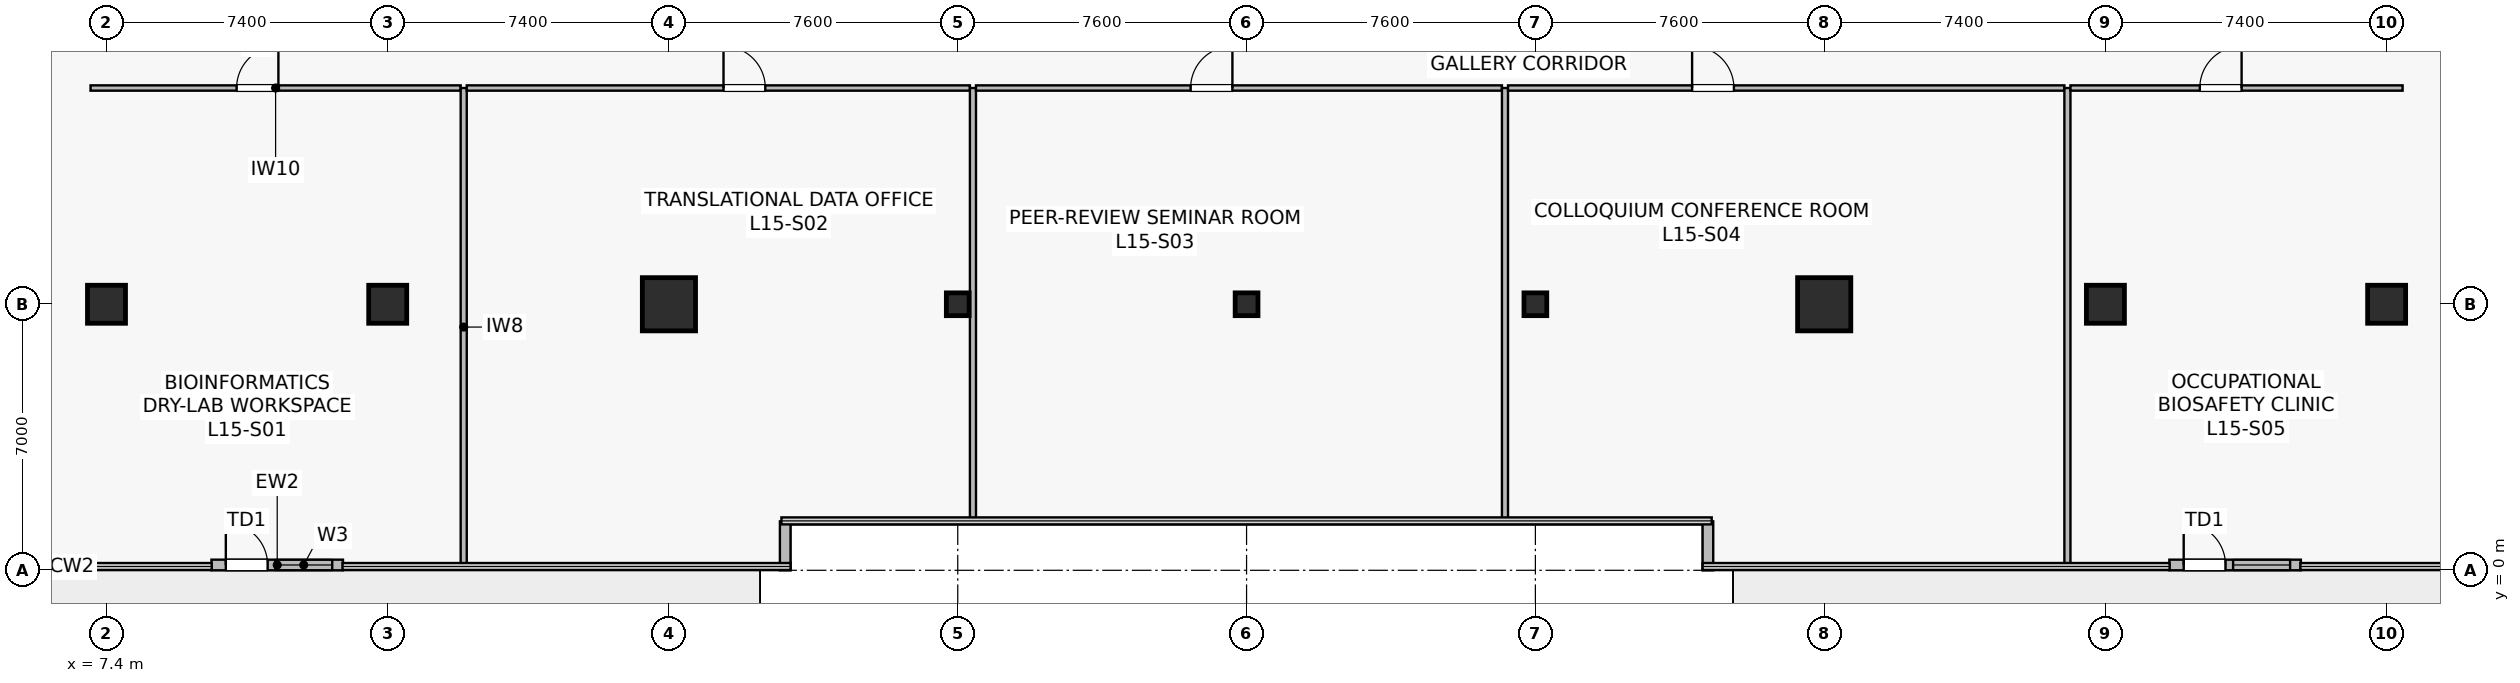
"""IFC4 building model, lengths in metres.
Left out: names, types, materials, properties, quantities, classifications, styles, units other than length and angle.
Written with IfcOpenShell. Run it as: python <this file> out.ifc"""

import sys

from ifc_helpers import new_model, si_unit, direction, frame, frame_2d, origin, origin_2d, place, context, subcontext, project, spatial, rectangle, hollow_rectangle, extrude, source, transform, mapped, element, fill, save


model = new_model("IFC4")
c1 = context("Model", 3, precision=1e-05, world=origin(), true_north=direction((0.0, 1.0)))
c2 = subcontext(c1, "Body", "Model", "MODEL_VIEW")
j1 = project(units=[si_unit("LENGTHUNIT", "METRE"), si_unit("PLANEANGLEUNIT", "RADIAN")], contexts=[c1])
p1 = place(None, origin())
s1 = spatial("IfcSite", under=j1, at=p1, CompositionType="ELEMENT")
p2 = place(p1, origin())
s2 = spatial("IfcBuilding", under=s1, at=p2, CompositionType="ELEMENT")
p3 = place(p2, frame((0.0, 0.0, 62.1)))
s3 = spatial("IfcBuildingStorey", under=s2, at=p3, CompositionType="ELEMENT", Elevation=62.1)
m1 = source(origin(), c2, "Body", "SweptSolid", [
    extrude(rectangle(XDim=1.0, YDim=1.0, at=origin_2d()), origin(), (0.0, 0.0, 1.0), 4.1),
])
p4 = place(p3, frame((14.8, 7.0, 0.0), z_axis=(0.0, 0.0, 1.0), x_axis=(1.0, 0.0, 0.0)))
e1 = element("IfcColumn", 1, at=p4, inside=s3, PredefinedType="COLUMN", context=c2, shape_type="MappedRepresentation", body=[
    mapped(m1, transform((0.0, 0.0, 0.0), scale=1.0)),
])
m2 = source(origin(), c2, "Body", "SweptSolid", [
    extrude(rectangle(XDim=1.4, YDim=1.4, at=origin_2d()), origin(), (0.0, 0.0, 1.0), 4.1),
])
for number, where, z_axis, x_axis in (
    (2, (22.2, 7.0, 0.0), (0.0, 0.0, 1.0), (1.0, 0.0, 0.0)),
    (3, (52.6, 7.0, 0.0), (0.0, 0.0, 1.0), (1.0, 0.0, 0.0)),
):
    element("IfcColumn", number, at=place(p3, frame(where, z_axis=z_axis, x_axis=x_axis)), inside=s3, PredefinedType="COLUMN", context=c2, shape_type="MappedRepresentation", body=[
        mapped(m2, transform((0.0, 0.0, 0.0), scale=1.0)),
    ])
for number, where, z_axis, x_axis in (
    (4, (60.0, 7.0, 0.0), (0.0, 0.0, 1.0), (1.0, 0.0, 0.0)),
    (5, (7.4, 7.0, 0.0), (0.0, 0.0, 1.0), (1.0, 0.0, 0.0)),
    (6, (67.4, 7.0, 0.0), (0.0, 0.0, 1.0), (1.0, 0.0, 0.0)),
):
    element("IfcColumn", number, at=place(p3, frame(where, z_axis=z_axis, x_axis=x_axis)), inside=s3, PredefinedType="COLUMN", context=c2, shape_type="MappedRepresentation", body=[
        mapped(m1, transform((0.0, 0.0, 0.0), scale=1.0)),
    ])
m3 = source(origin(), c2, "Body", "SweptSolid", [
    extrude(hollow_rectangle(XDim=0.6, YDim=0.6, WallThickness=0.028, at=origin_2d()), origin(), (0.0, 0.0, 1.0), 4.1),
])
for number, where, z_axis, x_axis in (
    (7, (29.8, 7.0, 0.0), (0.0, 0.0, 1.0), (1.0, 0.0, 0.0)),
    (8, (37.4, 7.0, 0.0), (0.0, 0.0, 1.0), (1.0, 0.0, 0.0)),
    (9, (45.0, 7.0, 0.0), (0.0, 0.0, 1.0), (1.0, 0.0, 0.0)),
):
    element("IfcColumn", number, at=place(p3, frame(where, z_axis=z_axis, x_axis=x_axis)), inside=s3, PredefinedType="COLUMN", context=c2, shape_type="MappedRepresentation", body=[
        mapped(m3, transform((0.0, 0.0, 0.0), scale=1.0)),
    ])
p5 = place(p3, frame((10.162, 0.14, 0.0), z_axis=(0.0, 0.0, 1.0), x_axis=(1.0, 0.0, 0.0)))
e10 = element("IfcWall", 10, at=p5, inside=s3, PredefinedType="STANDARD", context=c2, shape_type="SweptSolid", body=[
    extrude(rectangle(XDim=3.461, YDim=0.28, at=frame_2d((1.73, 0.0))), origin(), (0.0, 0.0, 1.0), 3.78),
])
p6 = place(p5, frame((0.378, 0.0, 0.0)))
e11 = element("IfcOpeningElement", 11, at=p6, cuts=e10, PredefinedType="OPENING", context=c2, shape_type="SweptSolid", body=[
    extrude(rectangle(XDim=1.1, YDim=2.2, at=frame_2d((0.55, 1.1))), frame((0.0, 0.15, 0.0), z_axis=(0.0, -1.0, 0.0), x_axis=(1.0, 0.0, 0.0)), (0.0, 0.0, 1.0), 0.3),
])
p7 = place(p5, frame((1.678, 0.0, 0.9)))
e12 = element("IfcOpeningElement", 12, at=p7, cuts=e10, PredefinedType="OPENING", context=c2, shape_type="SweptSolid", body=[
    extrude(rectangle(XDim=1.5, YDim=2.2, at=frame_2d((0.75, 1.1))), frame((0.0, 0.15, 0.0), z_axis=(0.0, -1.0, 0.0), x_axis=(1.0, 0.0, 0.0)), (0.0, 0.0, 1.0), 0.3),
])
p8 = place(p3, frame((61.682, 0.14, 0.0), z_axis=(0.0, 0.0, 1.0), x_axis=(1.0, 0.0, 0.0)))
e13 = element("IfcWall", 13, at=p8, inside=s3, PredefinedType="STANDARD", context=c2, shape_type="SweptSolid", body=[
    extrude(rectangle(XDim=3.461, YDim=0.28, at=frame_2d((1.73, 0.0))), origin(), (0.0, 0.0, 1.0), 3.78),
])
p9 = place(p8, frame((0.378, 0.0, 0.0)))
e14 = element("IfcOpeningElement", 14, at=p9, cuts=e13, PredefinedType="OPENING", context=c2, shape_type="SweptSolid", body=[
    extrude(rectangle(XDim=1.1, YDim=2.2, at=frame_2d((0.55, 1.1))), frame((0.0, 0.15, 0.0), z_axis=(0.0, -1.0, 0.0), x_axis=(1.0, 0.0, 0.0)), (0.0, 0.0, 1.0), 0.3),
])
p10 = place(p8, frame((1.678, 0.0, 0.9)))
e15 = element("IfcOpeningElement", 15, at=p10, cuts=e13, PredefinedType="OPENING", context=c2, shape_type="SweptSolid", body=[
    extrude(rectangle(XDim=1.5, YDim=2.2, at=frame_2d((0.75, 1.1))), frame((0.0, 0.15, 0.0), z_axis=(0.0, -1.0, 0.0), x_axis=(1.0, 0.0, 0.0)), (0.0, 0.0, 1.0), 0.3),
])
for number, where, z_axis, x_axis in (
    (16, (25.26, 0.0, 0.0), (0.0, 0.0, 1.0), (0.0, 1.0, 0.0)),
    (17, (49.54, 1.288, 0.0), (0.0, 0.0, 1.0), (0.0, -1.0, 0.0)),
):
    element("IfcWall", number, at=place(p3, frame(where, z_axis=z_axis, x_axis=x_axis)), inside=s3, PredefinedType="STANDARD", context=c2, shape_type="SweptSolid", body=[
        extrude(rectangle(XDim=1.288, YDim=0.28, at=frame_2d((0.644, 0.0))), origin(), (0.0, 0.0, 1.0), 3.78),
    ])
p11 = place(p3, frame((6.98, 12.69, 0.0), z_axis=(0.0, 0.0, 1.0), x_axis=(1.0, 0.0, 0.0)))
e18 = element("IfcWall", 18, at=p11, inside=s3, PredefinedType="PARTITIONING", context=c2, shape_type="SweptSolid", body=[
    extrude(rectangle(XDim=9.74, YDim=0.14, at=frame_2d((4.87, 0.0))), origin(), (0.0, 0.0, 1.0), 3.115),
])
p12 = place(p11, frame((3.844, 0.0, 0.0)))
e19 = element("IfcOpeningElement", 19, at=p12, cuts=e18, PredefinedType="OPENING", context=c2, shape_type="SweptSolid", body=[
    extrude(rectangle(XDim=1.1, YDim=2.18, at=frame_2d((0.55, 1.09))), frame((0.0, 0.08, 0.0), z_axis=(0.0, -1.0, 0.0), x_axis=(1.0, 0.0, 0.0)), (0.0, 0.0, 1.0), 0.16),
])
p13 = place(p3, frame((16.8, 0.11, 0.0), z_axis=(0.0, 0.0, 1.0), x_axis=(0.0, 1.0, 0.0)))
e20 = element("IfcWall", 20, at=p13, inside=s3, PredefinedType="PARTITIONING", context=c2, shape_type="SweptSolid", body=[
    extrude(rectangle(XDim=12.58, YDim=0.16, at=frame_2d((6.29, 0.0))), origin(), (0.0, 0.0, 1.0), 3.015),
])
p14 = place(p3, frame((16.88, 12.69, 0.0), z_axis=(0.0, 0.0, 1.0), x_axis=(1.0, 0.0, 0.0)))
e21 = element("IfcWall", 21, at=p14, inside=s3, PredefinedType="PARTITIONING", context=c2, shape_type="SweptSolid", body=[
    extrude(rectangle(XDim=13.24, YDim=0.14, at=frame_2d((6.62, 0.0))), origin(), (0.0, 0.0, 1.0), 3.115),
])
p15 = place(p14, frame((6.756, 0.0, 0.0)))
e22 = element("IfcOpeningElement", 22, at=p15, cuts=e21, PredefinedType="OPENING", context=c2, shape_type="SweptSolid", body=[
    extrude(rectangle(XDim=1.1, YDim=2.18, at=frame_2d((0.55, 1.09))), frame((0.0, 0.08, 0.0), z_axis=(0.0, -1.0, 0.0), x_axis=(1.0, 0.0, 0.0)), (0.0, 0.0, 1.0), 0.16),
])
p16 = place(p3, frame((30.2, 1.31, 0.0), z_axis=(0.0, 0.0, 1.0), x_axis=(0.0, 1.0, 0.0)))
e23 = element("IfcWall", 23, at=p16, inside=s3, PredefinedType="PARTITIONING", context=c2, shape_type="SweptSolid", body=[
    extrude(rectangle(XDim=11.38, YDim=0.16, at=frame_2d((5.69, 0.0))), origin(), (0.0, 0.0, 1.0), 3.015),
])
p17 = place(p3, frame((30.28, 12.69, 0.0), z_axis=(0.0, 0.0, 1.0), x_axis=(1.0, 0.0, 0.0)))
e24 = element("IfcWall", 24, at=p17, inside=s3, PredefinedType="PARTITIONING", context=c2, shape_type="SweptSolid", body=[
    extrude(rectangle(XDim=13.84, YDim=0.14, at=frame_2d((6.92, 0.0))), origin(), (0.0, 0.0, 1.0), 3.115),
])
p18 = place(p17, frame((5.648, 0.0, 0.0)))
e25 = element("IfcOpeningElement", 25, at=p18, cuts=e24, PredefinedType="OPENING", context=c2, shape_type="SweptSolid", body=[
    extrude(rectangle(XDim=1.1, YDim=2.18, at=frame_2d((0.55, 1.09))), frame((0.0, 0.08, 0.0), z_axis=(0.0, -1.0, 0.0), x_axis=(1.0, 0.0, 0.0)), (0.0, 0.0, 1.0), 0.16),
])
p19 = place(p3, frame((44.2, 1.31, 0.0), z_axis=(0.0, 0.0, 1.0), x_axis=(0.0, 1.0, 0.0)))
e26 = element("IfcWall", 26, at=p19, inside=s3, PredefinedType="PARTITIONING", context=c2, shape_type="SweptSolid", body=[
    extrude(rectangle(XDim=11.38, YDim=0.16, at=frame_2d((5.69, 0.0))), origin(), (0.0, 0.0, 1.0), 3.015),
])
p20 = place(p3, frame((44.28, 12.69, 0.0), z_axis=(0.0, 0.0, 1.0), x_axis=(1.0, 0.0, 0.0)))
e27 = element("IfcWall", 27, at=p20, inside=s3, PredefinedType="PARTITIONING", context=c2, shape_type="SweptSolid", body=[
    extrude(rectangle(XDim=14.64, YDim=0.14, at=frame_2d((7.32, 0.0))), origin(), (0.0, 0.0, 1.0), 3.115),
])
p21 = place(p20, frame((4.844, 0.0, 0.0)))
e28 = element("IfcOpeningElement", 28, at=p21, cuts=e27, PredefinedType="OPENING", context=c2, shape_type="SweptSolid", body=[
    extrude(rectangle(XDim=1.1, YDim=2.18, at=frame_2d((0.55, 1.09))), frame((0.0, 0.08, 0.0), z_axis=(0.0, -1.0, 0.0), x_axis=(1.0, 0.0, 0.0)), (0.0, 0.0, 1.0), 0.16),
])
p22 = place(p3, frame((59.0, 0.11, 0.0), z_axis=(0.0, 0.0, 1.0), x_axis=(0.0, 1.0, 0.0)))
e29 = element("IfcWall", 29, at=p22, inside=s3, PredefinedType="PARTITIONING", context=c2, shape_type="SweptSolid", body=[
    extrude(rectangle(XDim=12.58, YDim=0.16, at=frame_2d((6.29, 0.0))), origin(), (0.0, 0.0, 1.0), 3.015),
])
p23 = place(p3, frame((59.08, 12.69, 0.0), z_axis=(0.0, 0.0, 1.0), x_axis=(1.0, 0.0, 0.0)))
e30 = element("IfcWall", 30, at=p23, inside=s3, PredefinedType="PARTITIONING", context=c2, shape_type="SweptSolid", body=[
    extrude(rectangle(XDim=8.74, YDim=0.14, at=frame_2d((4.37, 0.0))), origin(), (0.0, 0.0, 1.0), 3.115),
])
p24 = place(p23, frame((3.404, 0.0, 0.0)))
e31 = element("IfcOpeningElement", 31, at=p24, cuts=e30, PredefinedType="OPENING", context=c2, shape_type="SweptSolid", body=[
    extrude(rectangle(XDim=1.1, YDim=2.18, at=frame_2d((0.55, 1.09))), frame((0.0, 0.08, 0.0), z_axis=(0.0, -1.0, 0.0), x_axis=(1.0, 0.0, 0.0)), (0.0, 0.0, 1.0), 0.16),
])
m4 = source(origin(), c2, "Body", "SweptSolid", [
    extrude(rectangle(XDim=1.1, YDim=2.2, at=frame_2d((0.55, 1.1))), frame((0.0, 0.025, 0.0), z_axis=(0.0, -1.0, 0.0), x_axis=(1.0, 0.0, 0.0)), (0.0, 0.0, 1.0), 0.05),
])
p25 = place(p6, origin())
e32 = element("IfcDoor", 32, at=p25, inside=s3, OperationType="SINGLE_SWING_LEFT", PredefinedType="DOOR", context=c2, shape_type="MappedRepresentation", body=[
    mapped(m4, transform((0.0, 0.0, 0.0), scale=1.0)),
])
fill(e11, e32)
m5 = source(origin(), c2, "Body", "SweptSolid", [
    extrude(rectangle(XDim=1.5, YDim=2.2, at=frame_2d((0.75, 1.1))), frame((0.0, 0.03, 0.0), z_axis=(0.0, -1.0, 0.0), x_axis=(1.0, 0.0, 0.0)), (0.0, 0.0, 1.0), 0.06),
])
p26 = place(p7, origin())
e33 = element("IfcWindow", 33, at=p26, inside=s3, PartitioningType="SINGLE_PANEL", PredefinedType="WINDOW", context=c2, shape_type="MappedRepresentation", body=[
    mapped(m5, transform((0.0, 0.0, 0.0), scale=1.0)),
])
fill(e12, e33)
p27 = place(p9, origin())
e34 = element("IfcDoor", 34, at=p27, inside=s3, OperationType="SINGLE_SWING_LEFT", PredefinedType="DOOR", context=c2, shape_type="MappedRepresentation", body=[
    mapped(m4, transform((0.0, 0.0, 0.0), scale=1.0)),
])
fill(e14, e34)
p28 = place(p10, origin())
e35 = element("IfcWindow", 35, at=p28, inside=s3, PartitioningType="SINGLE_PANEL", PredefinedType="WINDOW", context=c2, shape_type="MappedRepresentation", body=[
    mapped(m5, transform((0.0, 0.0, 0.0), scale=1.0)),
])
fill(e15, e35)
m6 = source(origin(), c2, "Body", "SweptSolid", [
    extrude(rectangle(XDim=1.1, YDim=2.18, at=frame_2d((0.55, 1.09))), frame((0.0, 0.025, 0.0), z_axis=(0.0, -1.0, 0.0), x_axis=(1.0, 0.0, 0.0)), (0.0, 0.0, 1.0), 0.05),
])
p29 = place(p12, origin())
e36 = element("IfcDoor", 36, at=p29, inside=s3, OperationType="SINGLE_SWING_RIGHT", PredefinedType="DOOR", context=c2, shape_type="MappedRepresentation", body=[
    mapped(m6, transform((0.0, 0.0, 0.0), scale=1.0)),
])
fill(e19, e36)
p30 = place(p15, origin())
e37 = element("IfcDoor", 37, at=p30, inside=s3, OperationType="SINGLE_SWING_LEFT", PredefinedType="DOOR", context=c2, shape_type="MappedRepresentation", body=[
    mapped(m6, transform((0.0, 0.0, 0.0), scale=1.0)),
])
fill(e22, e37)
p31 = place(p18, origin())
e38 = element("IfcDoor", 38, at=p31, inside=s3, OperationType="SINGLE_SWING_RIGHT", PredefinedType="DOOR", context=c2, shape_type="MappedRepresentation", body=[
    mapped(m6, transform((0.0, 0.0, 0.0), scale=1.0)),
])
fill(e25, e38)
p32 = place(p21, origin())
e39 = element("IfcDoor", 39, at=p32, inside=s3, OperationType="SINGLE_SWING_LEFT", PredefinedType="DOOR", context=c2, shape_type="MappedRepresentation", body=[
    mapped(m6, transform((0.0, 0.0, 0.0), scale=1.0)),
])
fill(e28, e39)
p33 = place(p24, origin())
e40 = element("IfcDoor", 40, at=p33, inside=s3, OperationType="SINGLE_SWING_RIGHT", PredefinedType="DOOR", context=c2, shape_type="MappedRepresentation", body=[
    mapped(m6, transform((0.0, 0.0, 0.0), scale=1.0)),
])
fill(e31, e40)
save(model, sys.argv[1])
